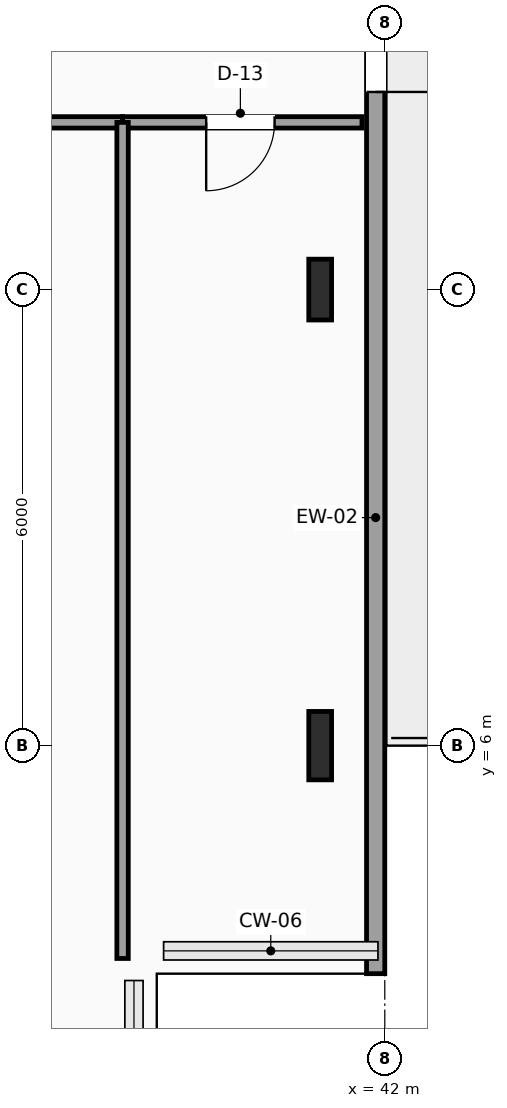
"""IFC4 building model, lengths in metres.
Left out: names, types, materials, properties, quantities, classifications, styles, units other than length and angle.
Written with IfcOpenShell. Run it as: python <this file> out.ifc"""

import sys

from ifc_helpers import new_model, si_unit, direction, frame, frame_2d, origin, origin_2d, place, context, subcontext, project, spatial, rectangle, i_section, extrude, element, fill, save


model = new_model("IFC4")
c1 = context("Model", 3, precision=1e-05, world=origin(), true_north=direction((0.0, 1.0)))
c2 = subcontext(c1, "Body", "Model", "MODEL_VIEW")
j1 = project(units=[si_unit("LENGTHUNIT", "METRE"), si_unit("PLANEANGLEUNIT", "RADIAN")], contexts=[c1])
p1 = place(None, origin())
s1 = spatial("IfcSite", under=j1, at=p1, CompositionType="ELEMENT")
p2 = place(p1, origin())
s2 = spatial("IfcBuilding", under=s1, at=p2, CompositionType="ELEMENT")
p3 = place(p2, frame((0.0, 0.0, 204.0)))
s3 = spatial("IfcBuildingStorey", under=s2, at=p3, CompositionType="ELEMENT", Elevation=204.0)
p4 = place(p3, frame((41.15, 6.0, 0.0), z_axis=(0.0, 0.0, 1.0), x_axis=(1.0, 0.0, 0.0)))
e1 = element("IfcColumn", 1, at=p4, inside=s3, PredefinedType="COLUMN", context=c2, shape_type="SweptSolid", body=[
    extrude(i_section(OverallWidth=0.3, OverallDepth=0.9, WebThickness=0.019, FlangeThickness=0.035, FilletRadius=0.03, at=origin_2d()), origin(), (0.0, 0.0, 1.0), 4.65),
])
p5 = place(p3, frame((41.15, 12.0, 0.0), z_axis=(0.0, 0.0, 1.0), x_axis=(1.0, 0.0, 0.0)))
e2 = element("IfcColumn", 2, at=p5, inside=s3, PredefinedType="COLUMN", context=c2, shape_type="SweptSolid", body=[
    extrude(i_section(OverallWidth=0.3, OverallDepth=0.8, WebThickness=0.018, FlangeThickness=0.033, FilletRadius=0.03, at=origin_2d()), origin(), (0.0, 0.0, 1.0), 4.65),
])
p6 = place(p3, frame((41.88, 21.0, 0.0), z_axis=(0.0, 0.0, 1.0), x_axis=(0.0, -1.0, 0.0)))
e3 = element("IfcWall", 3, at=p6, inside=s3, PredefinedType="SOLIDWALL", context=c2, shape_type="SweptSolid", body=[
    extrude(rectangle(XDim=18.0, YDim=0.24, at=frame_2d((9.0, 0.0))), origin(), (0.0, 0.0, 1.0), 4.44),
])
p7 = place(p6, frame((4.2, 0.0, 0.0)))
e4 = element("IfcOpeningElement", 4, at=p7, cuts=e3, PredefinedType="OPENING", context=c2, shape_type="SweptSolid", body=[
    extrude(rectangle(XDim=2.2, YDim=2.6, at=frame_2d((1.1, 1.3))), frame((0.0, 0.13, 0.0), z_axis=(0.0, -1.0, 0.0), x_axis=(1.0, 0.0, 0.0)), (0.0, 0.0, 1.0), 0.26),
])
p8 = place(p3, frame((41.7, 14.2, 0.0), z_axis=(0.0, 0.0, 1.0), x_axis=(-1.0, 0.0, 0.0)))
e5 = element("IfcWall", 5, at=p8, inside=s3, PredefinedType="PARTITIONING", context=c2, shape_type="SweptSolid", body=[
    extrude(rectangle(XDim=3.15, YDim=0.15, at=frame_2d((1.575, 0.0))), origin(), (0.0, 0.0, 1.0), 4.44),
])
p9 = place(p8, frame((1.15, 0.0, 0.0)))
e6 = element("IfcOpeningElement", 6, at=p9, cuts=e5, PredefinedType="OPENING", context=c2, shape_type="SweptSolid", body=[
    extrude(rectangle(XDim=0.9, YDim=2.1, at=frame_2d((0.45, 1.05))), frame((0.0, 0.085, 0.0), z_axis=(0.0, -1.0, 0.0), x_axis=(1.0, 0.0, 0.0)), (0.0, 0.0, 1.0), 0.17),
])
p10 = place(p3, frame((38.55, 14.2, 0.0), z_axis=(0.0, 0.0, 1.0), x_axis=(-1.0, 0.0, 0.0)))
e7 = element("IfcWall", 7, at=p10, inside=s3, PredefinedType="PARTITIONING", context=c2, shape_type="SweptSolid", body=[
    extrude(rectangle(XDim=2.4, YDim=0.15, at=frame_2d((1.2, 0.0))), origin(), (0.0, 0.0, 1.0), 4.44),
])
p11 = place(p3, frame((38.55, 3.2, 0.0), z_axis=(0.0, 0.0, 1.0), x_axis=(0.0, 1.0, 0.0)))
e8 = element("IfcWall", 8, at=p11, inside=s3, PredefinedType="PARTITIONING", context=c2, shape_type="SweptSolid", body=[
    extrude(rectangle(XDim=11.0, YDim=0.15, at=frame_2d((5.5, 0.0))), origin(), (0.0, 0.0, 1.0), 4.44),
])
p12 = place(p7, origin())
e9 = element("IfcDoor", 9, at=p12, inside=s3, OperationType="DOUBLE_DOOR_SINGLE_SWING", PredefinedType="DOOR", context=c2, shape_type="SweptSolid", body=[
    extrude(rectangle(XDim=2.2, YDim=2.6, at=frame_2d((1.1, 1.3))), frame((0.0, 0.025, 0.0), z_axis=(0.0, -1.0, 0.0), x_axis=(1.0, 0.0, 0.0)), (0.0, 0.0, 1.0), 0.05),
])
fill(e4, e9)
p13 = place(p9, origin())
e10 = element("IfcDoor", 10, at=p13, inside=s3, OperationType="SINGLE_SWING_RIGHT", PredefinedType="DOOR", context=c2, shape_type="SweptSolid", body=[
    extrude(rectangle(XDim=0.9, YDim=2.1, at=frame_2d((0.45, 1.05))), frame((0.0, 0.025, 0.0), z_axis=(0.0, -1.0, 0.0), x_axis=(1.0, 0.0, 0.0)), (0.0, 0.0, 1.0), 0.05),
])
fill(e6, e10)
save(model, sys.argv[1])
